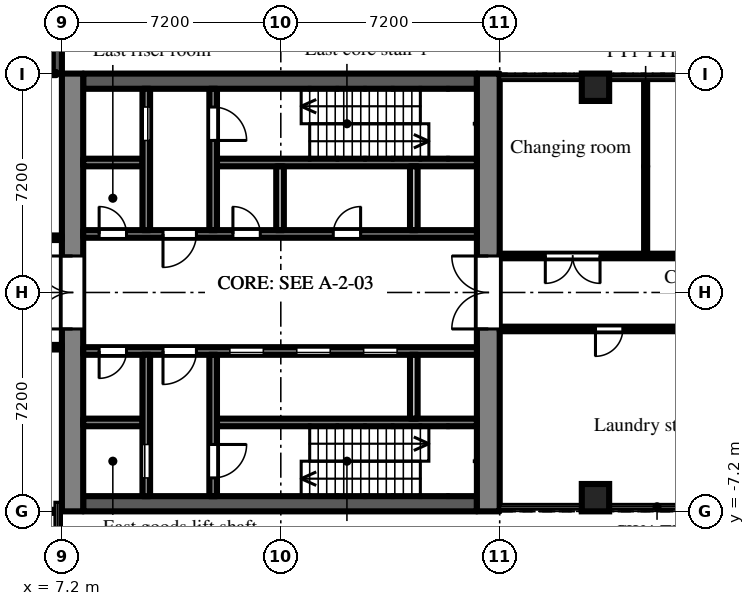
"""IFC4 building model, lengths in metres.
Left out: names, types, materials, properties, quantities, classifications, styles, units other than length and angle.
Written with IfcOpenShell. Run it as: python <this file> out.ifc"""

import sys

from ifc_helpers import new_model, si_unit, direction, frame, frame_2d, origin, origin_2d, place, context, subcontext, project, spatial, rectangle, extrude, element, fill, save


model = new_model("IFC4")
c1 = context("Model", 3, precision=1e-05, world=origin(), true_north=direction((0.0, 1.0)))
c2 = subcontext(c1, "Body", "Model", "MODEL_VIEW")
j1 = project(units=[si_unit("LENGTHUNIT", "METRE"), si_unit("PLANEANGLEUNIT", "RADIAN")], contexts=[c1])
p1 = place(None, origin())
s1 = spatial("IfcSite", under=j1, at=p1, CompositionType="ELEMENT")
p2 = place(p1, origin())
s2 = spatial("IfcBuilding", under=s1, at=p2, CompositionType="ELEMENT")
p3 = place(p2, frame((0.0, 0.0, 7.2)))
s3 = spatial("IfcBuildingStorey", under=s2, at=p3, CompositionType="ELEMENT", Elevation=7.2)
for number, where, z_axis, x_axis in (
    (1, (24.75, -6.75, 0.0), (0.0, 0.0, 1.0), (1.0, 0.0, 0.0)),
    (2, (24.75, 6.75, 0.0), (0.0, 0.0, 1.0), (1.0, 0.0, 0.0)),
):
    element("IfcColumn", number, at=place(p3, frame(where, z_axis=z_axis, x_axis=x_axis)), inside=s3, PredefinedType="COLUMN", context=c2, shape_type="SweptSolid", body=[
        extrude(rectangle(XDim=0.9, YDim=0.9, at=origin_2d()), origin(), (0.0, 0.0, 1.0), 4.5),
    ])
p4 = place(p3, frame((7.05, 7.2, 0.0), z_axis=(0.0, 0.0, 1.0), x_axis=(0.0, 1.0, 0.0)))
e3 = element("IfcWall", 3, at=p4, inside=s3, PredefinedType="SOLIDWALL", context=c2, shape_type="SweptSolid", body=[
    extrude(rectangle(XDim=7.2, YDim=0.3, at=frame_2d((3.6, 0.0))), origin(), (0.0, 0.0, 1.0), 4.075),
])
p5 = place(p4, frame((4.45, 0.0, 0.0)))
e4 = element("IfcOpeningElement", 4, at=p5, cuts=e3, PredefinedType="OPENING", context=c2, shape_type="SweptSolid", body=[
    extrude(rectangle(XDim=2.6, YDim=2.4, at=frame_2d((1.3, 1.2))), frame((0.0, 0.16, 0.0), z_axis=(0.0, -1.0, 0.0), x_axis=(1.0, 0.0, 0.0)), (0.0, 0.0, 1.0), 0.32),
])
p6 = place(p3, frame((7.55, -7.2, 0.0), z_axis=(0.0, 0.0, 1.0), x_axis=(0.0, 1.0, 0.0)))
e5 = element("IfcWall", 5, at=p6, inside=s3, PredefinedType="SHEAR", context=c2, shape_type="SweptSolid", body=[
    extrude(rectangle(XDim=14.4, YDim=0.7, at=frame_2d((7.2, 0.0))), origin(), (0.0, 0.0, 1.0), 4.075),
])
p7 = place(p6, frame((6.0, 0.0, 0.0)))
e6 = element("IfcOpeningElement", 6, at=p7, cuts=e5, PredefinedType="OPENING", context=c2, shape_type="SweptSolid", body=[
    extrude(rectangle(XDim=2.4, YDim=2.2, at=frame_2d((1.2, 1.1))), frame((0.0, 0.36, 0.0), z_axis=(0.0, -1.0, 0.0), x_axis=(1.0, 0.0, 0.0)), (0.0, 0.0, 1.0), 0.72),
])
p8 = place(p3, frame((21.225, -7.2, 0.0), z_axis=(0.0, 0.0, 1.0), x_axis=(0.0, 1.0, 0.0)))
e7 = element("IfcWall", 7, at=p8, inside=s3, PredefinedType="SHEAR", context=c2, shape_type="SweptSolid", body=[
    extrude(rectangle(XDim=14.4, YDim=0.75, at=frame_2d((7.2, 0.0))), origin(), (0.0, 0.0, 1.0), 4.075),
])
p9 = place(p8, frame((6.0, 0.0, 0.0)))
e8 = element("IfcOpeningElement", 8, at=p9, cuts=e7, PredefinedType="OPENING", context=c2, shape_type="SweptSolid", body=[
    extrude(rectangle(XDim=2.4, YDim=2.2, at=frame_2d((1.2, 1.1))), frame((0.0, 0.385, 0.0), z_axis=(0.0, -1.0, 0.0), x_axis=(1.0, 0.0, 0.0)), (0.0, 0.0, 1.0), 0.77),
])
p10 = place(p3, frame((7.9, 6.95, 0.0), z_axis=(0.0, 0.0, 1.0), x_axis=(1.0, 0.0, 0.0)))
e9 = element("IfcWall", 9, at=p10, inside=s3, PredefinedType="SHEAR", context=c2, shape_type="SweptSolid", body=[
    extrude(rectangle(XDim=12.95, YDim=0.5, at=frame_2d((6.475, 0.0))), origin(), (0.0, 0.0, 1.0), 4.075),
])
p11 = place(p3, frame((7.9, 1.925, 0.0), z_axis=(0.0, 0.0, 1.0), x_axis=(1.0, 0.0, 0.0)))
e10 = element("IfcWall", 10, at=p11, inside=s3, PredefinedType="SHEAR", context=c2, shape_type="SweptSolid", body=[
    extrude(rectangle(XDim=12.95, YDim=0.25, at=frame_2d((6.475, 0.0))), origin(), (0.0, 0.0, 1.0), 4.075),
])
p12 = place(p11, frame((0.525, 0.0, 0.0)))
e11 = element("IfcOpeningElement", 11, at=p12, cuts=e10, PredefinedType="OPENING", context=c2, shape_type="SweptSolid", body=[
    extrude(rectangle(XDim=0.9, YDim=2.1, at=frame_2d((0.45, 1.05))), frame((0.0, 0.135, 0.0), z_axis=(0.0, -1.0, 0.0), x_axis=(1.0, 0.0, 0.0)), (0.0, 0.0, 1.0), 0.27),
])
p13 = place(p11, frame((2.625, 0.0, 0.0)))
e12 = element("IfcOpeningElement", 12, at=p13, cuts=e10, PredefinedType="OPENING", context=c2, shape_type="SweptSolid", body=[
    extrude(rectangle(XDim=1.1, YDim=2.1, at=frame_2d((0.55, 1.05))), frame((0.0, 0.135, 0.0), z_axis=(0.0, -1.0, 0.0), x_axis=(1.0, 0.0, 0.0)), (0.0, 0.0, 1.0), 0.27),
])
p14 = place(p11, frame((4.925, 0.0, 0.0)))
e13 = element("IfcOpeningElement", 13, at=p14, cuts=e10, PredefinedType="OPENING", context=c2, shape_type="SweptSolid", body=[
    extrude(rectangle(XDim=0.9, YDim=2.1, at=frame_2d((0.45, 1.05))), frame((0.0, 0.135, 0.0), z_axis=(0.0, -1.0, 0.0), x_axis=(1.0, 0.0, 0.0)), (0.0, 0.0, 1.0), 0.27),
])
p15 = place(p11, frame((8.225, 0.0, 0.0)))
e14 = element("IfcOpeningElement", 14, at=p15, cuts=e10, PredefinedType="OPENING", context=c2, shape_type="SweptSolid", body=[
    extrude(rectangle(XDim=0.9, YDim=2.1, at=frame_2d((0.45, 1.05))), frame((0.0, 0.135, 0.0), z_axis=(0.0, -1.0, 0.0), x_axis=(1.0, 0.0, 0.0)), (0.0, 0.0, 1.0), 0.27),
])
p16 = place(p3, frame((7.9, 4.275, 0.0), z_axis=(0.0, 0.0, 1.0), x_axis=(1.0, 0.0, 0.0)))
e15 = element("IfcWall", 15, at=p16, inside=s3, PredefinedType="SHEAR", context=c2, shape_type="SweptSolid", body=[
    extrude(rectangle(XDim=1.95, YDim=0.25, at=frame_2d((0.975, 0.0))), origin(), (0.0, 0.0, 1.0), 4.075),
])
p17 = place(p3, frame((12.3, 4.275, 0.0), z_axis=(0.0, 0.0, 1.0), x_axis=(1.0, 0.0, 0.0)))
e16 = element("IfcWall", 16, at=p17, inside=s3, PredefinedType="SHEAR", context=c2, shape_type="SweptSolid", body=[
    extrude(rectangle(XDim=8.55, YDim=0.25, at=frame_2d((4.275, 0.0))), origin(), (0.0, 0.0, 1.0), 4.075),
])
p18 = place(p3, frame((9.975, 2.05, 0.0), z_axis=(0.0, 0.0, 1.0), x_axis=(0.0, 1.0, 0.0)))
e17 = element("IfcWall", 17, at=p18, inside=s3, PredefinedType="SHEAR", context=c2, shape_type="SweptSolid", body=[
    extrude(rectangle(XDim=4.65, YDim=0.25, at=frame_2d((2.325, 0.0))), origin(), (0.0, 0.0, 1.0), 4.075),
])
p19 = place(p18, frame((2.95, 0.0, 0.0)))
e18 = element("IfcOpeningElement", 18, at=p19, cuts=e17, PredefinedType="OPENING", context=c2, shape_type="SweptSolid", body=[
    extrude(rectangle(XDim=1.1, YDim=2.1, at=frame_2d((0.55, 1.05))), frame((0.0, 0.135, 0.0), z_axis=(0.0, -1.0, 0.0), x_axis=(1.0, 0.0, 0.0)), (0.0, 0.0, 1.0), 0.27),
])
p20 = place(p3, frame((12.175, 2.05, 0.0), z_axis=(0.0, 0.0, 1.0), x_axis=(0.0, 1.0, 0.0)))
e19 = element("IfcWall", 19, at=p20, inside=s3, PredefinedType="SHEAR", context=c2, shape_type="SweptSolid", body=[
    extrude(rectangle(XDim=4.65, YDim=0.25, at=frame_2d((2.325, 0.0))), origin(), (0.0, 0.0, 1.0), 4.075),
])
p21 = place(p20, frame((2.95, 0.0, 0.0)))
e20 = element("IfcOpeningElement", 20, at=p21, cuts=e19, PredefinedType="OPENING", context=c2, shape_type="SweptSolid", body=[
    extrude(rectangle(XDim=1.1, YDim=2.1, at=frame_2d((0.55, 1.05))), frame((0.0, 0.135, 0.0), z_axis=(0.0, -1.0, 0.0), x_axis=(1.0, 0.0, 0.0)), (0.0, 0.0, 1.0), 0.27),
])
for number, where, z_axis, x_axis in (
    (21, (14.375, 2.05, 0.0), (0.0, 0.0, 1.0), (0.0, 1.0, 0.0)),
    (22, (18.775, 2.05, 0.0), (0.0, 0.0, 1.0), (0.0, 1.0, 0.0)),
):
    element("IfcWall", number, at=place(p3, frame(where, z_axis=z_axis, x_axis=x_axis)), inside=s3, PredefinedType="PARTITIONING", context=c2, shape_type="SweptSolid", body=[
        extrude(rectangle(XDim=2.1, YDim=0.25, at=frame_2d((1.05, 0.0))), origin(), (0.0, 0.0, 1.0), 4.075),
    ])
p22 = place(p3, frame((7.9, -6.95, 0.0), z_axis=(0.0, 0.0, 1.0), x_axis=(1.0, 0.0, 0.0)))
e23 = element("IfcWall", 23, at=p22, inside=s3, PredefinedType="SHEAR", context=c2, shape_type="SweptSolid", body=[
    extrude(rectangle(XDim=12.95, YDim=0.5, at=frame_2d((6.475, 0.0))), origin(), (0.0, 0.0, 1.0), 4.075),
])
p23 = place(p3, frame((7.9, -1.925, 0.0), z_axis=(0.0, 0.0, 1.0), x_axis=(1.0, 0.0, 0.0)))
e24 = element("IfcWall", 24, at=p23, inside=s3, PredefinedType="SHEAR", context=c2, shape_type="SweptSolid", body=[
    extrude(rectangle(XDim=12.95, YDim=0.25, at=frame_2d((6.475, 0.0))), origin(), (0.0, 0.0, 1.0), 4.075),
])
p24 = place(p23, frame((4.825, 0.0, 0.0)))
e25 = element("IfcOpeningElement", 25, at=p24, cuts=e24, PredefinedType="OPENING", context=c2, shape_type="SweptSolid", body=[
    extrude(rectangle(XDim=1.1, YDim=2.1, at=frame_2d((0.55, 1.05))), frame((0.0, 0.135, 0.0), z_axis=(0.0, -1.0, 0.0), x_axis=(1.0, 0.0, 0.0)), (0.0, 0.0, 1.0), 0.27),
])
p25 = place(p23, frame((7.025, 0.0, 0.0)))
e26 = element("IfcOpeningElement", 26, at=p25, cuts=e24, PredefinedType="OPENING", context=c2, shape_type="SweptSolid", body=[
    extrude(rectangle(XDim=1.1, YDim=2.1, at=frame_2d((0.55, 1.05))), frame((0.0, 0.135, 0.0), z_axis=(0.0, -1.0, 0.0), x_axis=(1.0, 0.0, 0.0)), (0.0, 0.0, 1.0), 0.27),
])
p26 = place(p23, frame((9.225, 0.0, 0.0)))
e27 = element("IfcOpeningElement", 27, at=p26, cuts=e24, PredefinedType="OPENING", context=c2, shape_type="SweptSolid", body=[
    extrude(rectangle(XDim=1.1, YDim=2.1, at=frame_2d((0.55, 1.05))), frame((0.0, 0.135, 0.0), z_axis=(0.0, -1.0, 0.0), x_axis=(1.0, 0.0, 0.0)), (0.0, 0.0, 1.0), 0.27),
])
p27 = place(p23, frame((0.525, 0.0, 0.0)))
e28 = element("IfcOpeningElement", 28, at=p27, cuts=e24, PredefinedType="OPENING", context=c2, shape_type="SweptSolid", body=[
    extrude(rectangle(XDim=0.9, YDim=2.1, at=frame_2d((0.45, 1.05))), frame((0.0, 0.135, 0.0), z_axis=(0.0, -1.0, 0.0), x_axis=(1.0, 0.0, 0.0)), (0.0, 0.0, 1.0), 0.27),
])
p28 = place(p23, frame((2.625, 0.0, 0.0)))
e29 = element("IfcOpeningElement", 29, at=p28, cuts=e24, PredefinedType="OPENING", context=c2, shape_type="SweptSolid", body=[
    extrude(rectangle(XDim=1.1, YDim=2.1, at=frame_2d((0.55, 1.05))), frame((0.0, 0.135, 0.0), z_axis=(0.0, -1.0, 0.0), x_axis=(1.0, 0.0, 0.0)), (0.0, 0.0, 1.0), 0.27),
])
p29 = place(p3, frame((7.9, -4.275, 0.0), z_axis=(0.0, 0.0, 1.0), x_axis=(1.0, 0.0, 0.0)))
e30 = element("IfcWall", 30, at=p29, inside=s3, PredefinedType="SHEAR", context=c2, shape_type="SweptSolid", body=[
    extrude(rectangle(XDim=1.95, YDim=0.25, at=frame_2d((0.975, 0.0))), origin(), (0.0, 0.0, 1.0), 4.075),
])
p30 = place(p3, frame((12.3, -4.275, 0.0), z_axis=(0.0, 0.0, 1.0), x_axis=(1.0, 0.0, 0.0)))
e31 = element("IfcWall", 31, at=p30, inside=s3, PredefinedType="SHEAR", context=c2, shape_type="SweptSolid", body=[
    extrude(rectangle(XDim=8.55, YDim=0.25, at=frame_2d((4.275, 0.0))), origin(), (0.0, 0.0, 1.0), 4.075),
])
p31 = place(p3, frame((9.975, -2.05, 0.0), z_axis=(0.0, 0.0, 1.0), x_axis=(0.0, -1.0, 0.0)))
e32 = element("IfcWall", 32, at=p31, inside=s3, PredefinedType="SHEAR", context=c2, shape_type="SweptSolid", body=[
    extrude(rectangle(XDim=4.65, YDim=0.25, at=frame_2d((2.325, 0.0))), origin(), (0.0, 0.0, 1.0), 4.075),
])
p32 = place(p31, frame((2.95, 0.0, 0.0)))
e33 = element("IfcOpeningElement", 33, at=p32, cuts=e32, PredefinedType="OPENING", context=c2, shape_type="SweptSolid", body=[
    extrude(rectangle(XDim=1.1, YDim=2.1, at=frame_2d((0.55, 1.05))), frame((0.0, 0.135, 0.0), z_axis=(0.0, -1.0, 0.0), x_axis=(1.0, 0.0, 0.0)), (0.0, 0.0, 1.0), 0.27),
])
p33 = place(p3, frame((12.175, -2.05, 0.0), z_axis=(0.0, 0.0, 1.0), x_axis=(0.0, -1.0, 0.0)))
e34 = element("IfcWall", 34, at=p33, inside=s3, PredefinedType="SHEAR", context=c2, shape_type="SweptSolid", body=[
    extrude(rectangle(XDim=4.65, YDim=0.25, at=frame_2d((2.325, 0.0))), origin(), (0.0, 0.0, 1.0), 4.075),
])
p34 = place(p33, frame((2.95, 0.0, 0.0)))
e35 = element("IfcOpeningElement", 35, at=p34, cuts=e34, PredefinedType="OPENING", context=c2, shape_type="SweptSolid", body=[
    extrude(rectangle(XDim=1.1, YDim=2.1, at=frame_2d((0.55, 1.05))), frame((0.0, 0.135, 0.0), z_axis=(0.0, -1.0, 0.0), x_axis=(1.0, 0.0, 0.0)), (0.0, 0.0, 1.0), 0.27),
])
p35 = place(p3, frame((18.775, -2.05, 0.0), z_axis=(0.0, 0.0, 1.0), x_axis=(0.0, -1.0, 0.0)))
e36 = element("IfcWall", 36, at=p35, inside=s3, PredefinedType="PARTITIONING", context=c2, shape_type="SweptSolid", body=[
    extrude(rectangle(XDim=2.1, YDim=0.25, at=frame_2d((1.05, 0.0))), origin(), (0.0, 0.0, 1.0), 4.075),
])
p36 = place(p3, frame((1.875, -1.8, 0.0), z_axis=(0.0, 0.0, 1.0), x_axis=(1.0, 0.0, 0.0)))
e37 = element("IfcWall", 37, at=p36, inside=s3, PredefinedType="PARTITIONING", context=c2, shape_type="SweptSolid", body=[
    extrude(rectangle(XDim=5.325, YDim=0.15, at=frame_2d((2.663, 0.0))), origin(), (0.0, 0.0, 1.0), 4.075),
])
p37 = place(p36, frame((0.1, 0.0, 0.0)))
e38 = element("IfcOpeningElement", 38, at=p37, cuts=e37, PredefinedType="OPENING", context=c2, shape_type="SweptSolid", body=[
    extrude(rectangle(XDim=0.9, YDim=2.1, at=frame_2d((0.45, 1.05))), frame((0.0, 0.085, 0.0), z_axis=(0.0, -1.0, 0.0), x_axis=(1.0, 0.0, 0.0)), (0.0, 0.0, 1.0), 0.17),
])
p38 = place(p3, frame((1.875, 1.8, 0.0), z_axis=(0.0, 0.0, 1.0), x_axis=(1.0, 0.0, 0.0)))
e39 = element("IfcWall", 39, at=p38, inside=s3, PredefinedType="PARTITIONING", context=c2, shape_type="SweptSolid", body=[
    extrude(rectangle(XDim=5.325, YDim=0.15, at=frame_2d((2.663, 0.0))), origin(), (0.0, 0.0, 1.0), 4.075),
])
p39 = place(p3, frame((21.6, -1.2, 0.0), z_axis=(0.0, 0.0, 1.0), x_axis=(1.0, 0.0, 0.0)))
e40 = element("IfcWall", 40, at=p39, inside=s3, PredefinedType="PARTITIONING", context=c2, shape_type="SweptSolid", body=[
    extrude(rectangle(XDim=13.2, YDim=0.15, at=frame_2d((6.6, 0.0))), origin(), (0.0, 0.0, 1.0), 4.075),
])
p40 = place(p39, frame((3.15, 0.0, 0.0)))
e41 = element("IfcOpeningElement", 41, at=p40, cuts=e40, PredefinedType="OPENING", context=c2, shape_type="SweptSolid", body=[
    extrude(rectangle(XDim=0.9, YDim=2.1, at=frame_2d((0.45, 1.05))), frame((0.0, 0.085, 0.0), z_axis=(0.0, -1.0, 0.0), x_axis=(1.0, 0.0, 0.0)), (0.0, 0.0, 1.0), 0.17),
])
p41 = place(p39, frame((9.75, 0.0, 0.0)))
e42 = element("IfcOpeningElement", 42, at=p41, cuts=e40, PredefinedType="OPENING", context=c2, shape_type="SweptSolid", body=[
    extrude(rectangle(XDim=0.9, YDim=2.1, at=frame_2d((0.45, 1.05))), frame((0.0, 0.085, 0.0), z_axis=(0.0, -1.0, 0.0), x_axis=(1.0, 0.0, 0.0)), (0.0, 0.0, 1.0), 0.17),
])
p42 = place(p3, frame((21.6, 1.2, 0.0), z_axis=(0.0, 0.0, 1.0), x_axis=(1.0, 0.0, 0.0)))
e43 = element("IfcWall", 43, at=p42, inside=s3, PredefinedType="PARTITIONING", context=c2, shape_type="SweptSolid", body=[
    extrude(rectangle(XDim=13.2, YDim=0.15, at=frame_2d((6.6, 0.0))), origin(), (0.0, 0.0, 1.0), 4.075),
])
p43 = place(p42, frame((1.5, 0.0, 0.0)))
e44 = element("IfcOpeningElement", 44, at=p43, cuts=e43, PredefinedType="OPENING", context=c2, shape_type="SweptSolid", body=[
    extrude(rectangle(XDim=1.8, YDim=2.1, at=frame_2d((0.9, 1.05))), frame((0.0, 0.085, 0.0), z_axis=(0.0, -1.0, 0.0), x_axis=(1.0, 0.0, 0.0)), (0.0, 0.0, 1.0), 0.17),
])
p44 = place(p42, frame((8.1, 0.0, 0.0)))
e45 = element("IfcOpeningElement", 45, at=p44, cuts=e43, PredefinedType="OPENING", context=c2, shape_type="SweptSolid", body=[
    extrude(rectangle(XDim=1.8, YDim=2.1, at=frame_2d((0.9, 1.05))), frame((0.0, 0.085, 0.0), z_axis=(0.0, -1.0, 0.0), x_axis=(1.0, 0.0, 0.0)), (0.0, 0.0, 1.0), 0.17),
])
p45 = place(p3, frame((26.4, 1.275, 0.0), z_axis=(0.0, 0.0, 1.0), x_axis=(0.0, 1.0, 0.0)))
e46 = element("IfcWall", 46, at=p45, inside=s3, PredefinedType="PARTITIONING", context=c2, shape_type="SweptSolid", body=[
    extrude(rectangle(XDim=5.745, YDim=0.1, at=frame_2d((2.873, 0.0))), origin(), (0.0, 0.0, 1.0), 4.075),
])
for number, where, z_axis, x_axis in (
    (47, (3.75, -7.2, 0.0), (0.0, 0.0, 1.0), (1.0, 0.0, 0.0)),
    (48, (3.75, 7.2, 0.0), (0.0, 0.0, 1.0), (1.0, 0.0, 0.0)),
):
    element("IfcWall", number, at=place(p3, frame(where, z_axis=z_axis, x_axis=x_axis)), inside=s3, PredefinedType="PARTITIONING", context=c2, shape_type="SweptSolid", body=[
        extrude(rectangle(XDim=3.27, YDim=0.1, at=frame_2d((1.635, 0.0))), origin(), (0.0, 0.0, 1.0), 3.6),
    ])
p46 = place(p24, origin())
e49 = element("IfcDoor", 49, at=p46, inside=s3, OperationType="SLIDING_TO_LEFT", PredefinedType="DOOR", context=c2, shape_type="SweptSolid", body=[
    extrude(rectangle(XDim=1.1, YDim=2.1, at=frame_2d((0.55, 1.05))), frame((0.0, 0.025, 0.0), z_axis=(0.0, -1.0, 0.0), x_axis=(1.0, 0.0, 0.0)), (0.0, 0.0, 1.0), 0.05),
])
fill(e25, e49)
p47 = place(p25, origin())
e50 = element("IfcDoor", 50, at=p47, inside=s3, OperationType="SLIDING_TO_LEFT", PredefinedType="DOOR", context=c2, shape_type="SweptSolid", body=[
    extrude(rectangle(XDim=1.1, YDim=2.1, at=frame_2d((0.55, 1.05))), frame((0.0, 0.025, 0.0), z_axis=(0.0, -1.0, 0.0), x_axis=(1.0, 0.0, 0.0)), (0.0, 0.0, 1.0), 0.05),
])
fill(e26, e50)
p48 = place(p26, origin())
e51 = element("IfcDoor", 51, at=p48, inside=s3, OperationType="SLIDING_TO_LEFT", PredefinedType="DOOR", context=c2, shape_type="SweptSolid", body=[
    extrude(rectangle(XDim=1.1, YDim=2.1, at=frame_2d((0.55, 1.05))), frame((0.0, 0.025, 0.0), z_axis=(0.0, -1.0, 0.0), x_axis=(1.0, 0.0, 0.0)), (0.0, 0.0, 1.0), 0.05),
])
fill(e27, e51)
p49 = place(p19, origin())
e52 = element("IfcDoor", 52, at=p49, inside=s3, OperationType="SLIDING_TO_LEFT", PredefinedType="DOOR", context=c2, shape_type="SweptSolid", body=[
    extrude(rectangle(XDim=1.1, YDim=2.1, at=frame_2d((0.55, 1.05))), frame((0.0, 0.025, 0.0), z_axis=(0.0, -1.0, 0.0), x_axis=(1.0, 0.0, 0.0)), (0.0, 0.0, 1.0), 0.05),
])
fill(e18, e52)
p50 = place(p32, origin())
e53 = element("IfcDoor", 53, at=p50, inside=s3, OperationType="SLIDING_TO_LEFT", PredefinedType="DOOR", context=c2, shape_type="SweptSolid", body=[
    extrude(rectangle(XDim=1.1, YDim=2.1, at=frame_2d((0.55, 1.05))), frame((0.0, 0.025, 0.0), z_axis=(0.0, -1.0, 0.0), x_axis=(1.0, 0.0, 0.0)), (0.0, 0.0, 1.0), 0.05),
])
fill(e33, e53)
p51 = place(p21, frame((1.1, 0.0, 0.0), z_axis=(0.0, 0.0, 1.0), x_axis=(-1.0, 0.0, 0.0)))
e54 = element("IfcDoor", 54, at=p51, inside=s3, OperationType="SINGLE_SWING_RIGHT", PredefinedType="DOOR", context=c2, shape_type="SweptSolid", body=[
    extrude(rectangle(XDim=1.1, YDim=2.1, at=frame_2d((0.55, 1.05))), frame((0.0, 0.025, 0.0), z_axis=(0.0, -1.0, 0.0), x_axis=(1.0, 0.0, 0.0)), (0.0, 0.0, 1.0), 0.05),
])
fill(e20, e54)
p52 = place(p34, origin())
e55 = element("IfcDoor", 55, at=p52, inside=s3, OperationType="SINGLE_SWING_LEFT", PredefinedType="DOOR", context=c2, shape_type="SweptSolid", body=[
    extrude(rectangle(XDim=1.1, YDim=2.1, at=frame_2d((0.55, 1.05))), frame((0.0, 0.025, 0.0), z_axis=(0.0, -1.0, 0.0), x_axis=(1.0, 0.0, 0.0)), (0.0, 0.0, 1.0), 0.05),
])
fill(e35, e55)
p53 = place(p12, origin())
e56 = element("IfcDoor", 56, at=p53, inside=s3, OperationType="SINGLE_SWING_LEFT", PredefinedType="DOOR", context=c2, shape_type="SweptSolid", body=[
    extrude(rectangle(XDim=0.9, YDim=2.1, at=frame_2d((0.45, 1.05))), frame((0.0, 0.025, 0.0), z_axis=(0.0, -1.0, 0.0), x_axis=(1.0, 0.0, 0.0)), (0.0, 0.0, 1.0), 0.05),
])
fill(e11, e56)
p54 = place(p27, frame((0.9, 0.0, 0.0), z_axis=(0.0, 0.0, 1.0), x_axis=(-1.0, 0.0, 0.0)))
e57 = element("IfcDoor", 57, at=p54, inside=s3, OperationType="SINGLE_SWING_RIGHT", PredefinedType="DOOR", context=c2, shape_type="SweptSolid", body=[
    extrude(rectangle(XDim=0.9, YDim=2.1, at=frame_2d((0.45, 1.05))), frame((0.0, 0.025, 0.0), z_axis=(0.0, -1.0, 0.0), x_axis=(1.0, 0.0, 0.0)), (0.0, 0.0, 1.0), 0.05),
])
fill(e28, e57)
p55 = place(p13, frame((1.1, 0.0, 0.0), z_axis=(0.0, 0.0, 1.0), x_axis=(-1.0, 0.0, 0.0)))
e58 = element("IfcDoor", 58, at=p55, inside=s3, OperationType="SINGLE_SWING_RIGHT", PredefinedType="DOOR", context=c2, shape_type="SweptSolid", body=[
    extrude(rectangle(XDim=1.1, YDim=2.1, at=frame_2d((0.55, 1.05))), frame((0.0, 0.025, 0.0), z_axis=(0.0, -1.0, 0.0), x_axis=(1.0, 0.0, 0.0)), (0.0, 0.0, 1.0), 0.05),
])
fill(e12, e58)
p56 = place(p28, frame((1.1, 0.0, 0.0), z_axis=(0.0, 0.0, 1.0), x_axis=(-1.0, 0.0, 0.0)))
e59 = element("IfcDoor", 59, at=p56, inside=s3, OperationType="SINGLE_SWING_RIGHT", PredefinedType="DOOR", context=c2, shape_type="SweptSolid", body=[
    extrude(rectangle(XDim=1.1, YDim=2.1, at=frame_2d((0.55, 1.05))), frame((0.0, 0.025, 0.0), z_axis=(0.0, -1.0, 0.0), x_axis=(1.0, 0.0, 0.0)), (0.0, 0.0, 1.0), 0.05),
])
fill(e29, e59)
p57 = place(p7, origin())
e60 = element("IfcDoor", 60, at=p57, inside=s3, OperationType="DOUBLE_DOOR_DOUBLE_SWING", PredefinedType="DOOR", context=c2, shape_type="SweptSolid", body=[
    extrude(rectangle(XDim=2.4, YDim=2.2, at=frame_2d((1.2, 1.1))), frame((0.0, 0.025, 0.0), z_axis=(0.0, -1.0, 0.0), x_axis=(1.0, 0.0, 0.0)), (0.0, 0.0, 1.0), 0.05),
])
fill(e6, e60)
p58 = place(p9, origin())
e61 = element("IfcDoor", 61, at=p58, inside=s3, OperationType="DOUBLE_DOOR_DOUBLE_SWING", PredefinedType="DOOR", context=c2, shape_type="SweptSolid", body=[
    extrude(rectangle(XDim=2.4, YDim=2.2, at=frame_2d((1.2, 1.1))), frame((0.0, 0.025, 0.0), z_axis=(0.0, -1.0, 0.0), x_axis=(1.0, 0.0, 0.0)), (0.0, 0.0, 1.0), 0.05),
])
fill(e8, e61)
p59 = place(p14, origin())
e62 = element("IfcDoor", 62, at=p59, inside=s3, OperationType="SINGLE_SWING_LEFT", PredefinedType="DOOR", context=c2, shape_type="SweptSolid", body=[
    extrude(rectangle(XDim=0.9, YDim=2.1, at=frame_2d((0.45, 1.05))), frame((0.0, 0.025, 0.0), z_axis=(0.0, -1.0, 0.0), x_axis=(1.0, 0.0, 0.0)), (0.0, 0.0, 1.0), 0.05),
])
fill(e13, e62)
p60 = place(p15, origin())
e63 = element("IfcDoor", 63, at=p60, inside=s3, OperationType="SINGLE_SWING_RIGHT", PredefinedType="DOOR", context=c2, shape_type="SweptSolid", body=[
    extrude(rectangle(XDim=0.9, YDim=2.1, at=frame_2d((0.45, 1.05))), frame((0.0, 0.025, 0.0), z_axis=(0.0, -1.0, 0.0), x_axis=(1.0, 0.0, 0.0)), (0.0, 0.0, 1.0), 0.05),
])
fill(e14, e63)
p61 = place(p43, frame((1.8, 0.0, 0.0), z_axis=(0.0, 0.0, 1.0), x_axis=(-1.0, 0.0, 0.0)))
e64 = element("IfcDoor", 64, at=p61, inside=s3, OperationType="DOUBLE_DOOR_DOUBLE_SWING", PredefinedType="DOOR", context=c2, shape_type="SweptSolid", body=[
    extrude(rectangle(XDim=1.8, YDim=2.1, at=frame_2d((0.9, 1.05))), frame((0.0, 0.025, 0.0), z_axis=(0.0, -1.0, 0.0), x_axis=(1.0, 0.0, 0.0)), (0.0, 0.0, 1.0), 0.05),
])
fill(e44, e64)
p62 = place(p40, frame((0.9, 0.0, 0.0), z_axis=(0.0, 0.0, 1.0), x_axis=(-1.0, 0.0, 0.0)))
e65 = element("IfcDoor", 65, at=p62, inside=s3, OperationType="SINGLE_SWING_RIGHT", PredefinedType="DOOR", context=c2, shape_type="SweptSolid", body=[
    extrude(rectangle(XDim=0.9, YDim=2.1, at=frame_2d((0.45, 1.05))), frame((0.0, 0.025, 0.0), z_axis=(0.0, -1.0, 0.0), x_axis=(1.0, 0.0, 0.0)), (0.0, 0.0, 1.0), 0.05),
])
fill(e41, e65)
save(model, sys.argv[1])
